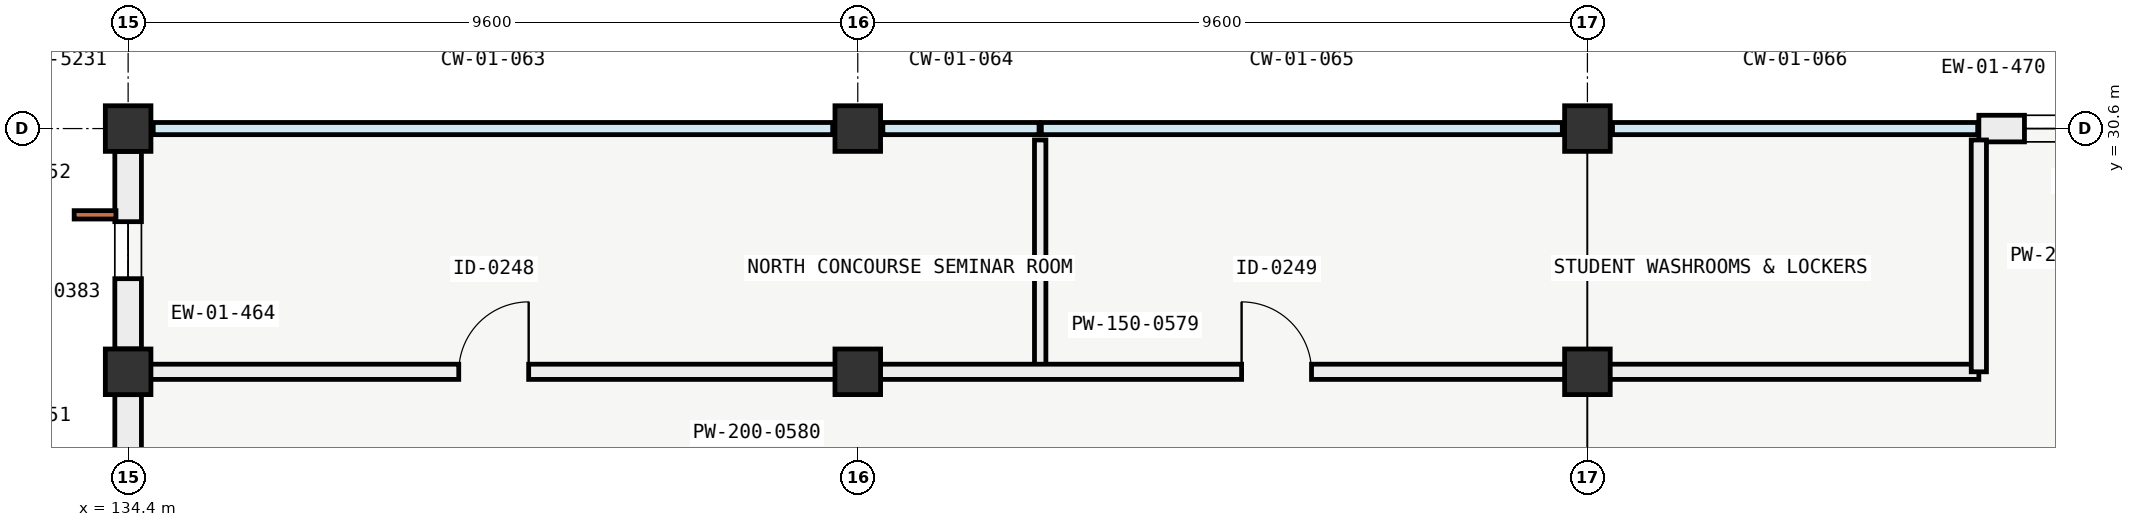
"""IFC4 building model, lengths in metres.
Left out: names, types, materials, properties, quantities, classifications, styles, units other than length and angle.
Written with IfcOpenShell. Run it as: python <this file> out.ifc"""

import sys

from ifc_helpers import new_model, si_unit, direction, frame, frame_2d, origin, origin_2d, place, context, subcontext, project, spatial, rectangle, extrude, element, fill, save


model = new_model("IFC4")
c1 = context("Model", 3, precision=1e-05, world=origin(), true_north=direction((0.0, 1.0)))
c2 = subcontext(c1, "Body", "Model", "MODEL_VIEW")
j1 = project(units=[si_unit("LENGTHUNIT", "METRE"), si_unit("PLANEANGLEUNIT", "RADIAN")], contexts=[c1])
p1 = place(None, origin())
s1 = spatial("IfcSite", under=j1, at=p1, CompositionType="ELEMENT")
p2 = place(p1, origin())
s2 = spatial("IfcBuilding", under=s1, at=p2, CompositionType="ELEMENT")
p3 = place(p2, frame((0.0, 0.0, 9.6)))
s3 = spatial("IfcBuildingStorey", under=s2, at=p3, CompositionType="ELEMENT", Elevation=9.6)
for number, where, z_axis, x_axis in (
    (1, (134.4, 27.4, 0.0), (0.0, 0.0, 1.0), (1.0, 0.0, 0.0)),
    (2, (134.4, 30.6, 0.0), (0.0, 0.0, 1.0), (1.0, 0.0, 0.0)),
    (3, (144.0, 27.4, 0.0), (0.0, 0.0, 1.0), (1.0, 0.0, 0.0)),
    (4, (144.0, 30.6, 0.0), (0.0, 0.0, 1.0), (1.0, 0.0, 0.0)),
    (5, (153.6, 27.4, 0.0), (0.0, 0.0, 1.0), (1.0, 0.0, 0.0)),
    (6, (153.6, 30.6, 0.0), (0.0, 0.0, 1.0), (1.0, 0.0, 0.0)),
):
    element("IfcColumn", number, at=place(p3, frame(where, z_axis=z_axis, x_axis=x_axis)), inside=s3, PredefinedType="COLUMN", context=c2, shape_type="SweptSolid", body=[
        extrude(rectangle(XDim=0.6, YDim=0.6, at=origin_2d()), origin(), (0.0, 0.0, 1.0), 4.2),
    ])
p4 = place(p3, frame((134.4, 24.501, 0.0), z_axis=(0.0, 0.0, 1.0), x_axis=(0.0, 1.0, 0.0)))
e7 = element("IfcWall", 7, at=p4, inside=s3, PredefinedType="SOLIDWALL", context=c2, shape_type="SweptSolid", body=[
    extrude(rectangle(XDim=2.598, YDim=0.35, at=frame_2d((1.299, 0.0))), origin(), (0.0, 0.0, 1.0), 2.33),
])
p5 = place(p4, frame((0.924, 0.0, 0.75)))
e8 = element("IfcOpeningElement", 8, at=p5, cuts=e7, PredefinedType="OPENING", context=c2, shape_type="SweptSolid", body=[
    extrude(rectangle(XDim=0.75, YDim=1.1, at=frame_2d((0.375, 0.55))), frame((0.0, 0.185, 0.0), z_axis=(0.0, -1.0, 0.0), x_axis=(1.0, 0.0, 0.0)), (0.0, 0.0, 1.0), 0.37),
])
p6 = place(p3, frame((134.4, 27.701, 0.0), z_axis=(0.0, 0.0, 1.0), x_axis=(0.0, 1.0, 0.0)))
e9 = element("IfcWall", 9, at=p6, inside=s3, PredefinedType="SOLIDWALL", context=c2, shape_type="SweptSolid", body=[
    extrude(rectangle(XDim=2.598, YDim=0.35, at=frame_2d((1.299, 0.0))), origin(), (0.0, 0.0, 1.0), 2.33),
])
p7 = place(p6, frame((0.924, 0.0, 0.9)))
e10 = element("IfcOpeningElement", 10, at=p7, cuts=e9, PredefinedType="OPENING", context=c2, shape_type="SweptSolid", body=[
    extrude(rectangle(XDim=0.75, YDim=1.1, at=frame_2d((0.375, 0.55))), frame((0.0, 0.185, 0.0), z_axis=(0.0, -1.0, 0.0), x_axis=(1.0, 0.0, 0.0)), (0.0, 0.0, 1.0), 0.37),
])
p8 = place(p3, frame((158.75, 30.6, 0.0), z_axis=(0.0, 0.0, 1.0), x_axis=(1.0, 0.0, 0.0)))
e11 = element("IfcWall", 11, at=p8, inside=s3, PredefinedType="SOLIDWALL", context=c2, shape_type="SweptSolid", body=[
    extrude(rectangle(XDim=3.2, YDim=0.35, at=frame_2d((1.6, 0.0))), origin(), (0.0, 0.0, 1.0), 3.25),
])
p9 = place(p8, frame((0.6, 0.0, 0.75)))
e12 = element("IfcOpeningElement", 12, at=p9, cuts=e11, PredefinedType="OPENING", context=c2, shape_type="SweptSolid", body=[
    extrude(rectangle(XDim=2.0, YDim=1.35, at=frame_2d((1.0, 0.675))), frame((0.0, 0.185, 0.0), z_axis=(0.0, -1.0, 0.0), x_axis=(1.0, 0.0, 0.0)), (0.0, 0.0, 1.0), 0.37),
])
p10 = place(p3, frame((146.4, 27.4, 0.0), z_axis=(0.0, 0.0, 1.0), x_axis=(0.0, 1.0, 0.0)))
e13 = element("IfcWall", 13, at=p10, inside=s3, PredefinedType="PARTITIONING", context=c2, shape_type="SweptSolid", body=[
    extrude(rectangle(XDim=3.05, YDim=0.15, at=frame_2d((1.525, 0.0))), origin(), (0.0, 0.0, 1.0), 3.28),
])
p11 = place(p3, frame((134.55, 27.4, 0.0), z_axis=(0.0, 0.0, 1.0), x_axis=(1.0, 0.0, 0.0)))
e14 = element("IfcWall", 14, at=p11, inside=s3, PredefinedType="PARTITIONING", context=c2, shape_type="SweptSolid", body=[
    extrude(rectangle(XDim=24.2, YDim=0.2, at=frame_2d((12.1, 0.0))), origin(), (0.0, 0.0, 1.0), 2.33),
])
p12 = place(p11, frame((4.2, 0.0, 0.0)))
e15 = element("IfcOpeningElement", 15, at=p12, cuts=e14, PredefinedType="OPENING", context=c2, shape_type="SweptSolid", body=[
    extrude(rectangle(XDim=0.92, YDim=2.1, at=frame_2d((0.46, 1.05))), frame((0.0, 0.11, 0.0), z_axis=(0.0, -1.0, 0.0), x_axis=(1.0, 0.0, 0.0)), (0.0, 0.0, 1.0), 0.22),
])
p13 = place(p11, frame((14.5, 0.0, 0.0)))
e16 = element("IfcOpeningElement", 16, at=p13, cuts=e14, PredefinedType="OPENING", context=c2, shape_type="SweptSolid", body=[
    extrude(rectangle(XDim=0.92, YDim=2.1, at=frame_2d((0.46, 1.05))), frame((0.0, 0.11, 0.0), z_axis=(0.0, -1.0, 0.0), x_axis=(1.0, 0.0, 0.0)), (0.0, 0.0, 1.0), 0.22),
])
p14 = place(p3, frame((158.75, 27.4, 0.0), z_axis=(0.0, 0.0, 1.0), x_axis=(0.0, 1.0, 0.0)))
e17 = element("IfcWall", 17, at=p14, inside=s3, PredefinedType="PARTITIONING", context=c2, shape_type="SweptSolid", body=[
    extrude(rectangle(XDim=3.05, YDim=0.2, at=frame_2d((1.525, 0.0))), origin(), (0.0, 0.0, 1.0), 3.28),
])
p15 = place(p7, origin())
e18 = element("IfcWindow", 18, at=p15, inside=s3, PartitioningType="SINGLE_PANEL", PredefinedType="WINDOW", context=c2, shape_type="SweptSolid", body=[
    extrude(rectangle(XDim=0.75, YDim=1.1, at=frame_2d((0.375, 0.55))), frame((0.0, 0.03, 0.0), z_axis=(0.0, -1.0, 0.0), x_axis=(1.0, 0.0, 0.0)), (0.0, 0.0, 1.0), 0.06),
])
fill(e10, e18)
p16 = place(p9, origin())
e19 = element("IfcWindow", 19, at=p16, inside=s3, PartitioningType="SINGLE_PANEL", PredefinedType="WINDOW", context=c2, shape_type="SweptSolid", body=[
    extrude(rectangle(XDim=2.0, YDim=1.35, at=frame_2d((1.0, 0.675))), frame((0.0, 0.03, 0.0), z_axis=(0.0, -1.0, 0.0), x_axis=(1.0, 0.0, 0.0)), (0.0, 0.0, 1.0), 0.06),
])
fill(e12, e19)
p17 = place(p12, origin())
e20 = element("IfcDoor", 20, at=p17, inside=s3, OperationType="SINGLE_SWING_RIGHT", PredefinedType="DOOR", context=c2, shape_type="SweptSolid", body=[
    extrude(rectangle(XDim=0.92, YDim=2.1, at=frame_2d((0.46, 1.05))), frame((0.0, 0.025, 0.0), z_axis=(0.0, -1.0, 0.0), x_axis=(1.0, 0.0, 0.0)), (0.0, 0.0, 1.0), 0.05),
])
fill(e15, e20)
p18 = place(p13, origin())
e21 = element("IfcDoor", 21, at=p18, inside=s3, OperationType="SINGLE_SWING_LEFT", PredefinedType="DOOR", context=c2, shape_type="SweptSolid", body=[
    extrude(rectangle(XDim=0.92, YDim=2.1, at=frame_2d((0.46, 1.05))), frame((0.0, 0.025, 0.0), z_axis=(0.0, -1.0, 0.0), x_axis=(1.0, 0.0, 0.0)), (0.0, 0.0, 1.0), 0.05),
])
fill(e16, e21)
save(model, sys.argv[1])
